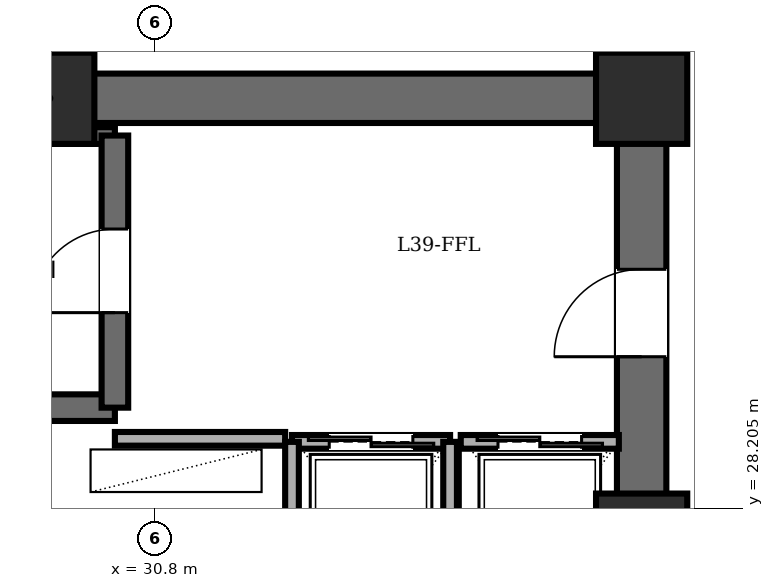
"""IFC4 building model, lengths in metres.
Left out: names, types, materials, properties, quantities, classifications, styles, units other than length and angle.
Written with IfcOpenShell. Run it as: python <this file> out.ifc"""

import sys

from ifc_helpers import new_model, si_unit, direction, frame, frame_2d, origin, origin_2d, place, context, subcontext, project, spatial, rectangle, extrude, element, fill, save


model = new_model("IFC4")
c1 = context("Model", 3, precision=1e-05, world=origin(), true_north=direction((0.0, 1.0)))
c2 = subcontext(c1, "Body", "Model", "MODEL_VIEW")
j1 = project(units=[si_unit("LENGTHUNIT", "METRE"), si_unit("PLANEANGLEUNIT", "RADIAN")], contexts=[c1])
p1 = place(None, origin())
s1 = spatial("IfcSite", under=j1, at=p1, CompositionType="ELEMENT")
p2 = place(p1, origin())
s2 = spatial("IfcBuilding", under=s1, at=p2, CompositionType="ELEMENT")
p3 = place(p2, frame((0.0, 0.0, 151.0)))
s3 = spatial("IfcBuildingStorey", under=s2, at=p3, CompositionType="ELEMENT", Elevation=151.0)
for number, where, z_axis, x_axis in (
    (1, (37.2, 27.8, 0.0), (0.0, 0.0, 1.0), (1.0, 0.0, 0.0)),
    (2, (37.2, 33.6, 0.0), (0.0, 0.0, 1.0), (1.0, 0.0, 0.0)),
    (3, (29.4, 33.6, 0.0), (0.0, 0.0, 1.0), (1.0, 0.0, 0.0)),
):
    element("IfcColumn", number, at=place(p3, frame(where, z_axis=z_axis, x_axis=x_axis)), inside=s3, PredefinedType="COLUMN", context=c2, shape_type="SweptSolid", body=[
        extrude(rectangle(XDim=1.2, YDim=1.2, at=origin_2d()), origin(), (0.0, 0.0, 1.0), 3.6),
    ])
p4 = place(p3, frame((21.6, 33.6, 0.0), z_axis=(0.0, 0.0, 1.0), x_axis=(1.0, 0.0, 0.0)))
e4 = element("IfcWall", 4, at=p4, inside=s3, PredefinedType="SHEAR", context=c2, shape_type="SweptSolid", body=[
    extrude(rectangle(XDim=15.6, YDim=0.65, at=frame_2d((7.8, 0.0))), origin(), (0.0, 0.0, 1.0), 3.4),
])
p5 = place(p3, frame((37.2, 14.4, 0.0), z_axis=(0.0, 0.0, 1.0), x_axis=(0.0, 1.0, 0.0)))
e5 = element("IfcWall", 5, at=p5, inside=s3, PredefinedType="SHEAR", context=c2, shape_type="SweptSolid", body=[
    extrude(rectangle(XDim=19.2, YDim=0.65, at=frame_2d((9.6, 0.0))), origin(), (0.0, 0.0, 1.0), 3.4),
])
p6 = place(p5, frame((15.8, 0.0, 0.0)))
e6 = element("IfcOpeningElement", 6, at=p6, cuts=e5, PredefinedType="OPENING", context=c2, shape_type="SweptSolid", body=[
    extrude(rectangle(XDim=1.15, YDim=2.15, at=frame_2d((0.575, 1.075))), frame((0.0, 0.335, 0.0), z_axis=(0.0, -1.0, 0.0), x_axis=(1.0, 0.0, 0.0)), (0.0, 0.0, 1.0), 0.67),
])
p7 = place(p5, frame((3.6, 0.0, 0.0)))
e7 = element("IfcOpeningElement", 7, at=p7, cuts=e5, PredefinedType="OPENING", context=c2, shape_type="SweptSolid", body=[
    extrude(rectangle(XDim=1.1, YDim=2.15, at=frame_2d((0.55, 1.075))), frame((0.0, 0.335, 0.0), z_axis=(0.0, -1.0, 0.0), x_axis=(1.0, 0.0, 0.0)), (0.0, 0.0, 1.0), 0.67),
])
p8 = place(p5, frame((8.6, 0.0, 0.0)))
e8 = element("IfcOpeningElement", 8, at=p8, cuts=e5, PredefinedType="OPENING", context=c2, shape_type="SweptSolid", body=[
    extrude(rectangle(XDim=1.3, YDim=2.2, at=frame_2d((0.65, 1.1))), frame((0.0, 0.335, 0.0), z_axis=(0.0, -1.0, 0.0), x_axis=(1.0, 0.0, 0.0)), (0.0, 0.0, 1.0), 0.67),
])
p9 = place(p3, frame((22.48, 29.53, 0.0), z_axis=(0.0, 0.0, 1.0), x_axis=(1.0, 0.0, 0.0)))
e9 = element("IfcWall", 9, at=p9, inside=s3, PredefinedType="SOLIDWALL", context=c2, shape_type="SweptSolid", body=[
    extrude(rectangle(XDim=7.79, YDim=0.35, at=frame_2d((3.895, 0.0))), origin(), (0.0, 0.0, 1.0), 3.4),
])
p10 = place(p3, frame((22.48, 33.11, 0.0), z_axis=(0.0, 0.0, 1.0), x_axis=(1.0, 0.0, 0.0)))
e10 = element("IfcWall", 10, at=p10, inside=s3, PredefinedType="PARTITIONING", context=c2, shape_type="SweptSolid", body=[
    extrude(rectangle(XDim=7.79, YDim=0.22, at=frame_2d((3.895, 0.0))), origin(), (0.0, 0.0, 1.0), 3.4),
])
p11 = place(p3, frame((30.27, 29.53, 0.0), z_axis=(0.0, 0.0, 1.0), x_axis=(0.0, 1.0, 0.0)))
e11 = element("IfcWall", 11, at=p11, inside=s3, PredefinedType="SOLIDWALL", context=c2, shape_type="SweptSolid", body=[
    extrude(rectangle(XDim=3.58, YDim=0.35, at=frame_2d((1.79, 0.0))), origin(), (0.0, 0.0, 1.0), 3.4),
])
p12 = place(p11, frame((1.25, 0.0, 0.0)))
e12 = element("IfcOpeningElement", 12, at=p12, cuts=e11, PredefinedType="OPENING", context=c2, shape_type="SweptSolid", body=[
    extrude(rectangle(XDim=1.1, YDim=2.15, at=frame_2d((0.55, 1.075))), frame((0.0, 0.185, 0.0), z_axis=(0.0, -1.0, 0.0), x_axis=(1.0, 0.0, 0.0)), (0.0, 0.0, 1.0), 0.37),
])
p13 = place(p3, frame((30.27, 29.12, 0.0), z_axis=(0.0, 0.0, 1.0), x_axis=(1.0, 0.0, 0.0)))
e13 = element("IfcWall", 13, at=p13, inside=s3, PredefinedType="PARTITIONING", context=c2, shape_type="SweptSolid", body=[
    extrude(rectangle(XDim=2.24, YDim=0.18, at=frame_2d((1.12, 0.0))), origin(), (0.0, 0.0, 1.0), 3.4),
])
p14 = place(p3, frame((32.6, 29.08, 0.0), z_axis=(0.0, 0.0, 1.0), x_axis=(1.0, 0.0, 0.0)))
e14 = element("IfcWall", 14, at=p14, inside=s3, PredefinedType="PARTITIONING", context=c2, shape_type="SweptSolid", body=[
    extrude(rectangle(XDim=2.08, YDim=0.18, at=frame_2d((1.04, 0.0))), origin(), (0.0, 0.0, 1.0), 3.4),
])
p15 = place(p14, frame((0.49, 0.0, 0.0)))
e15 = element("IfcOpeningElement", 15, at=p15, cuts=e14, PredefinedType="OPENING", context=c2, shape_type="SweptSolid", body=[
    extrude(rectangle(XDim=1.1, YDim=2.2, at=frame_2d((0.55, 1.1))), frame((0.0, 0.1, 0.0), z_axis=(0.0, -1.0, 0.0), x_axis=(1.0, 0.0, 0.0)), (0.0, 0.0, 1.0), 0.2),
])
for number, where, z_axis, x_axis in (
    (16, (34.68, 26.35, 0.0), (0.0, 0.0, 1.0), (0.0, 1.0, 0.0)),
    (17, (32.6, 29.08, 0.0), (0.0, 0.0, 1.0), (0.0, -1.0, 0.0)),
):
    element("IfcWall", number, at=place(p3, frame(where, z_axis=z_axis, x_axis=x_axis)), inside=s3, PredefinedType="PARTITIONING", context=c2, shape_type="SweptSolid", body=[
        extrude(rectangle(XDim=2.73, YDim=0.18, at=frame_2d((1.365, 0.0))), origin(), (0.0, 0.0, 1.0), 3.4),
    ])
p16 = place(p3, frame((34.82, 29.08, 0.0), z_axis=(0.0, 0.0, 1.0), x_axis=(1.0, 0.0, 0.0)))
e18 = element("IfcWall", 18, at=p16, inside=s3, PredefinedType="PARTITIONING", context=c2, shape_type="SweptSolid", body=[
    extrude(rectangle(XDim=2.08, YDim=0.18, at=frame_2d((1.04, 0.0))), origin(), (0.0, 0.0, 1.0), 3.4),
])
p17 = place(p16, frame((0.49, 0.0, 0.0)))
e19 = element("IfcOpeningElement", 19, at=p17, cuts=e18, PredefinedType="OPENING", context=c2, shape_type="SweptSolid", body=[
    extrude(rectangle(XDim=1.1, YDim=2.2, at=frame_2d((0.55, 1.1))), frame((0.0, 0.1, 0.0), z_axis=(0.0, -1.0, 0.0), x_axis=(1.0, 0.0, 0.0)), (0.0, 0.0, 1.0), 0.2),
])
p18 = place(p12, origin())
e20 = element("IfcDoor", 20, at=p18, inside=s3, OperationType="SINGLE_SWING_LEFT", PredefinedType="DOOR", context=c2, shape_type="SweptSolid", body=[
    extrude(rectangle(XDim=1.1, YDim=2.15, at=frame_2d((0.55, 1.075))), frame((0.0, 0.025, 0.0), z_axis=(0.0, -1.0, 0.0), x_axis=(1.0, 0.0, 0.0)), (0.0, 0.0, 1.0), 0.05),
])
fill(e12, e20)
p19 = place(p6, origin())
e21 = element("IfcDoor", 21, at=p19, inside=s3, OperationType="SINGLE_SWING_LEFT", PredefinedType="DOOR", context=c2, shape_type="SweptSolid", body=[
    extrude(rectangle(XDim=1.15, YDim=2.15, at=frame_2d((0.575, 1.075))), frame((0.0, 0.025, 0.0), z_axis=(0.0, -1.0, 0.0), x_axis=(1.0, 0.0, 0.0)), (0.0, 0.0, 1.0), 0.05),
])
fill(e6, e21)
p20 = place(p15, origin())
e22 = element("IfcDoor", 22, at=p20, inside=s3, OperationType="DOUBLE_DOOR_SLIDING", PredefinedType="DOOR", context=c2, shape_type="SweptSolid", body=[
    extrude(rectangle(XDim=1.1, YDim=2.2, at=frame_2d((0.55, 1.1))), frame((0.0, 0.025, 0.0), z_axis=(0.0, -1.0, 0.0), x_axis=(1.0, 0.0, 0.0)), (0.0, 0.0, 1.0), 0.05),
])
fill(e15, e22)
p21 = place(p17, origin())
e23 = element("IfcDoor", 23, at=p21, inside=s3, OperationType="DOUBLE_DOOR_SLIDING", PredefinedType="DOOR", context=c2, shape_type="SweptSolid", body=[
    extrude(rectangle(XDim=1.1, YDim=2.2, at=frame_2d((0.55, 1.1))), frame((0.0, 0.025, 0.0), z_axis=(0.0, -1.0, 0.0), x_axis=(1.0, 0.0, 0.0)), (0.0, 0.0, 1.0), 0.05),
])
fill(e19, e23)
save(model, sys.argv[1])
